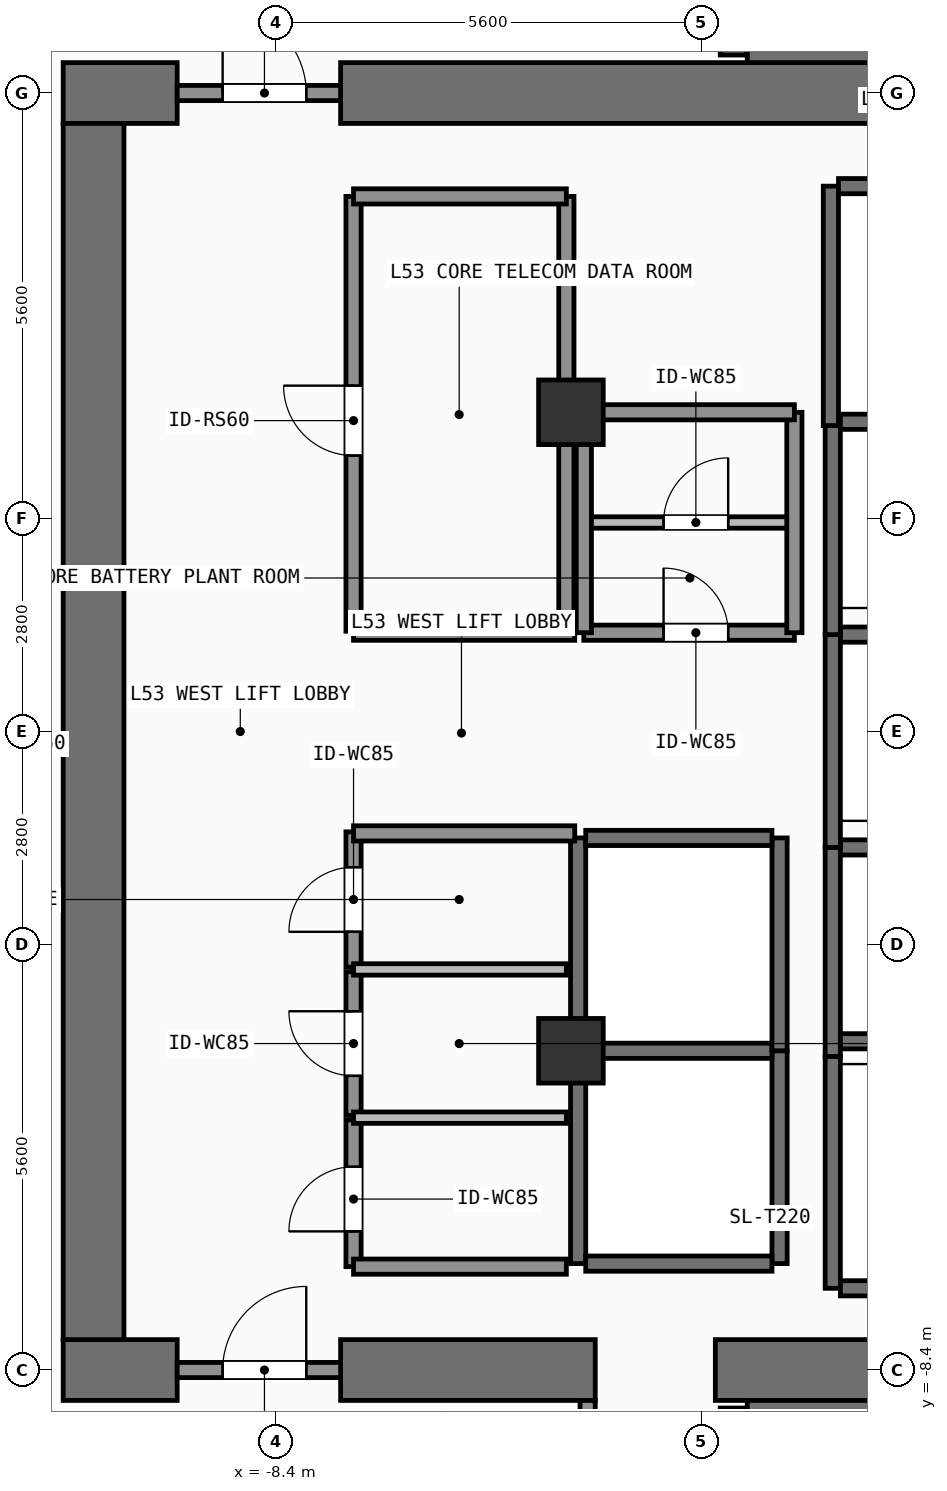
"""IFC4 building model, lengths in metres.
Left out: names, types, materials, properties, quantities, classifications, styles, units other than length and angle.
Written with IfcOpenShell. Run it as: python <this file> out.ifc"""

import sys

from ifc_helpers import new_model, si_unit, direction, frame, frame_2d, origin, origin_2d, place, context, subcontext, project, spatial, rectangle, extrude, element, fill, save


model = new_model("IFC4")
c1 = context("Model", 3, precision=1e-05, world=origin(), true_north=direction((0.0, 1.0)))
c2 = subcontext(c1, "Body", "Model", "MODEL_VIEW")
j1 = project(units=[si_unit("LENGTHUNIT", "METRE"), si_unit("PLANEANGLEUNIT", "RADIAN")], contexts=[c1])
p1 = place(None, origin())
s1 = spatial("IfcSite", under=j1, at=p1, CompositionType="ELEMENT")
p2 = place(p1, origin())
s2 = spatial("IfcBuilding", under=s1, at=p2, CompositionType="ELEMENT")
p3 = place(p2, frame((0.0, 0.0, 215.7)))
s3 = spatial("IfcBuildingStorey", under=s2, at=p3, CompositionType="ELEMENT", Elevation=215.7)
p4 = place(p3, frame((-11.2, -8.4, 0.0), z_axis=(0.0, 0.0, 1.0), x_axis=(1.0, 0.0, 0.0)))
e1 = element("IfcWall", 1, at=p4, inside=s3, PredefinedType="SHEAR", context=c2, shape_type="SweptSolid", body=[
    extrude(rectangle(XDim=1.5, YDim=0.8, at=frame_2d((0.75, 0.0))), origin(), (0.0, 0.0, 1.0), 3.9),
])
p5 = place(p3, frame((-7.55, -8.4, 0.0), z_axis=(0.0, 0.0, 1.0), x_axis=(1.0, 0.0, 0.0)))
e2 = element("IfcWall", 2, at=p5, inside=s3, PredefinedType="SHEAR", context=c2, shape_type="SweptSolid", body=[
    extrude(rectangle(XDim=3.35, YDim=0.8, at=frame_2d((1.675, 0.0))), origin(), (0.0, 0.0, 1.0), 3.9),
])
p6 = place(p3, frame((-2.62, -8.4, 0.0), z_axis=(0.0, 0.0, 1.0), x_axis=(1.0, 0.0, 0.0)))
e3 = element("IfcWall", 3, at=p6, inside=s3, PredefinedType="SHEAR", context=c2, shape_type="SweptSolid", body=[
    extrude(rectangle(XDim=7.27, YDim=0.8, at=frame_2d((3.635, 0.0))), origin(), (0.0, 0.0, 1.0), 3.9),
])
p7 = place(p3, frame((-11.2, 8.4, 0.0), z_axis=(0.0, 0.0, 1.0), x_axis=(1.0, 0.0, 0.0)))
e4 = element("IfcWall", 4, at=p7, inside=s3, PredefinedType="SHEAR", context=c2, shape_type="SweptSolid", body=[
    extrude(rectangle(XDim=1.5, YDim=0.8, at=frame_2d((0.75, 0.0))), origin(), (0.0, 0.0, 1.0), 3.9),
])
p8 = place(p3, frame((-7.55, 8.4, 0.0), z_axis=(0.0, 0.0, 1.0), x_axis=(1.0, 0.0, 0.0)))
e5 = element("IfcWall", 5, at=p8, inside=s3, PredefinedType="SHEAR", context=c2, shape_type="SweptSolid", body=[
    extrude(rectangle(XDim=16.35, YDim=0.8, at=frame_2d((8.175, 0.0))), origin(), (0.0, 0.0, 1.0), 3.9),
])
p9 = place(p3, frame((-10.8, -8.0, 0.0), z_axis=(0.0, 0.0, 1.0), x_axis=(0.0, 1.0, 0.0)))
e6 = element("IfcWall", 6, at=p9, inside=s3, PredefinedType="SHEAR", context=c2, shape_type="SweptSolid", body=[
    extrude(rectangle(XDim=16.0, YDim=0.8, at=frame_2d((8.0, 0.0))), origin(), (0.0, 0.0, 1.0), 3.9),
])
p10 = place(p3, frame((-2.2, -8.913, 0.0), z_axis=(0.0, 0.0, 1.0), x_axis=(1.0, 0.0, 0.0)))
e7 = element("IfcWall", 7, at=p10, inside=s3, PredefinedType="SHEAR", context=c2, shape_type="SweptSolid", body=[
    extrude(rectangle(XDim=6.6, YDim=0.225, at=frame_2d((3.3, 0.0))), origin(), (0.0, 0.0, 1.0), 3.9),
])
p11 = place(p3, frame((-2.38, -11.825, 0.0), z_axis=(0.0, 0.0, 1.0), x_axis=(0.0, 1.0, 0.0)))
e8 = element("IfcWall", 8, at=p11, inside=s3, PredefinedType="SHEAR", context=c2, shape_type="SweptSolid", body=[
    extrude(rectangle(XDim=2.925, YDim=0.35, at=frame_2d((1.462, 0.0))), origin(), (0.0, 0.0, 1.0), 3.9),
])
p12 = place(p3, frame((-2.2, 8.913, 0.0), z_axis=(0.0, 0.0, 1.0), x_axis=(1.0, 0.0, 0.0)))
e9 = element("IfcWall", 9, at=p12, inside=s3, PredefinedType="SHEAR", context=c2, shape_type="SweptSolid", body=[
    extrude(rectangle(XDim=6.6, YDim=0.225, at=frame_2d((3.3, 0.0))), origin(), (0.0, 0.0, 1.0), 3.9),
])
p13 = place(p3, frame((-2.38, 8.9, 0.0), z_axis=(0.0, 0.0, 1.0), x_axis=(0.0, 1.0, 0.0)))
e10 = element("IfcWall", 10, at=p13, inside=s3, PredefinedType="SHEAR", context=c2, shape_type="SweptSolid", body=[
    extrude(rectangle(XDim=2.925, YDim=0.35, at=frame_2d((1.462, 0.0))), origin(), (0.0, 0.0, 1.0), 3.9),
])
for number, where, z_axis, x_axis in (
    (11, (-4.52, -4.2, 0.0), (0.0, 0.0, 1.0), (1.0, 0.0, 0.0)),
    (12, (-4.52, 4.2, 0.0), (0.0, 0.0, 1.0), (1.0, 0.0, 0.0)),
):
    element("IfcColumn", number, at=place(p3, frame(where, z_axis=z_axis, x_axis=x_axis)), inside=s3, PredefinedType="COLUMN", context=c2, shape_type="SweptSolid", body=[
        extrude(rectangle(XDim=0.85, YDim=0.85, at=origin_2d()), origin(), (0.0, 0.0, 1.0), 3.9),
    ])
for number, where, z_axis, x_axis in (
    (13, (-4.425, -7.0, 0.0), (0.0, 0.0, 1.0), (0.0, 1.0, 0.0)),
    (14, (-1.775, -7.0, 0.0), (0.0, 0.0, 1.0), (0.0, 1.0, 0.0)),
):
    element("IfcWall", number, at=place(p3, frame(where, z_axis=z_axis, x_axis=x_axis)), inside=s3, PredefinedType="SHEAR", context=c2, shape_type="SweptSolid", body=[
        extrude(rectangle(XDim=2.8, YDim=0.2, at=frame_2d((1.4, 0.0))), origin(), (0.0, 0.0, 1.0), 3.62),
    ])
for number, where, z_axis, x_axis in (
    (15, (-4.325, -7.0, 0.0), (0.0, 0.0, 1.0), (1.0, 0.0, 0.0)),
    (16, (-4.325, -4.2, 0.0), (0.0, 0.0, 1.0), (1.0, 0.0, 0.0)),
):
    element("IfcWall", number, at=place(p3, frame(where, z_axis=z_axis, x_axis=x_axis)), inside=s3, PredefinedType="SHEAR", context=c2, shape_type="SweptSolid", body=[
        extrude(rectangle(XDim=2.45, YDim=0.2, at=frame_2d((1.225, 0.0))), origin(), (0.0, 0.0, 1.0), 3.62),
    ])
for number, where, z_axis, x_axis in (
    (17, (-4.425, -4.2, 0.0), (0.0, 0.0, 1.0), (0.0, 1.0, 0.0)),
    (18, (-1.775, -4.2, 0.0), (0.0, 0.0, 1.0), (0.0, 1.0, 0.0)),
):
    element("IfcWall", number, at=place(p3, frame(where, z_axis=z_axis, x_axis=x_axis)), inside=s3, PredefinedType="SHEAR", context=c2, shape_type="SweptSolid", body=[
        extrude(rectangle(XDim=2.8, YDim=0.2, at=frame_2d((1.4, 0.0))), origin(), (0.0, 0.0, 1.0), 3.62),
    ])
p14 = place(p3, frame((-4.325, -1.4, 0.0), z_axis=(0.0, 0.0, 1.0), x_axis=(1.0, 0.0, 0.0)))
e19 = element("IfcWall", 19, at=p14, inside=s3, PredefinedType="SHEAR", context=c2, shape_type="SweptSolid", body=[
    extrude(rectangle(XDim=2.45, YDim=0.2, at=frame_2d((1.225, 0.0))), origin(), (0.0, 0.0, 1.0), 3.62),
])
p15 = place(p3, frame((-1.075, -4.275, 0.0), z_axis=(0.0, 0.0, 1.0), x_axis=(0.0, 1.0, 0.0)))
e20 = element("IfcWall", 20, at=p15, inside=s3, PredefinedType="SHEAR", context=c2, shape_type="SweptSolid", body=[
    extrude(rectangle(XDim=2.75, YDim=0.2, at=frame_2d((1.375, 0.0))), origin(), (0.0, 0.0, 1.0), 3.62),
])
for number, where, z_axis, x_axis in (
    (21, (-0.975, -4.075, 0.0), (0.0, 0.0, 1.0), (1.0, 0.0, 0.0)),
    (22, (-0.975, -1.525, 0.0), (0.0, 0.0, 1.0), (1.0, 0.0, 0.0)),
):
    element("IfcWall", number, at=place(p3, frame(where, z_axis=z_axis, x_axis=x_axis)), inside=s3, PredefinedType="SHEAR", context=c2, shape_type="SweptSolid", body=[
        extrude(rectangle(XDim=2.35, YDim=0.2, at=frame_2d((1.175, 0.0))), origin(), (0.0, 0.0, 1.0), 3.62),
    ])
p16 = place(p3, frame((-1.075, -1.525, 0.0), z_axis=(0.0, 0.0, 1.0), x_axis=(0.0, 1.0, 0.0)))
e23 = element("IfcWall", 23, at=p16, inside=s3, PredefinedType="SHEAR", context=c2, shape_type="SweptSolid", body=[
    extrude(rectangle(XDim=2.8, YDim=0.2, at=frame_2d((1.4, 0.0))), origin(), (0.0, 0.0, 1.0), 3.62),
])
p17 = place(p3, frame((-0.975, 1.275, 0.0), z_axis=(0.0, 0.0, 1.0), x_axis=(1.0, 0.0, 0.0)))
e24 = element("IfcWall", 24, at=p17, inside=s3, PredefinedType="SHEAR", context=c2, shape_type="SweptSolid", body=[
    extrude(rectangle(XDim=2.35, YDim=0.2, at=frame_2d((1.175, 0.0))), origin(), (0.0, 0.0, 1.0), 3.62),
])
p18 = place(p3, frame((-1.075, 1.275, 0.0), z_axis=(0.0, 0.0, 1.0), x_axis=(0.0, 1.0, 0.0)))
e25 = element("IfcWall", 25, at=p18, inside=s3, PredefinedType="SHEAR", context=c2, shape_type="SweptSolid", body=[
    extrude(rectangle(XDim=2.8, YDim=0.2, at=frame_2d((1.4, 0.0))), origin(), (0.0, 0.0, 1.0), 3.62),
])
p19 = place(p3, frame((-0.975, 4.075, 0.0), z_axis=(0.0, 0.0, 1.0), x_axis=(1.0, 0.0, 0.0)))
e26 = element("IfcWall", 26, at=p19, inside=s3, PredefinedType="SHEAR", context=c2, shape_type="SweptSolid", body=[
    extrude(rectangle(XDim=2.35, YDim=0.2, at=frame_2d((1.175, 0.0))), origin(), (0.0, 0.0, 1.0), 3.62),
])
p20 = place(p3, frame((-1.1, 4.025, 0.0), z_axis=(0.0, 0.0, 1.0), x_axis=(0.0, 1.0, 0.0)))
e27 = element("IfcWall", 27, at=p20, inside=s3, PredefinedType="SHEAR", context=c2, shape_type="SweptSolid", body=[
    extrude(rectangle(XDim=3.15, YDim=0.2, at=frame_2d((1.575, 0.0))), origin(), (0.0, 0.0, 1.0), 3.62),
])
p21 = place(p3, frame((-1.0, 7.175, 0.0), z_axis=(0.0, 0.0, 1.0), x_axis=(1.0, 0.0, 0.0)))
e28 = element("IfcWall", 28, at=p21, inside=s3, PredefinedType="SHEAR", context=c2, shape_type="SweptSolid", body=[
    extrude(rectangle(XDim=2.4, YDim=0.2, at=frame_2d((1.2, 0.0))), origin(), (0.0, 0.0, 1.0), 3.62),
])
p22 = place(p3, frame((-1.075, -7.325, 0.0), z_axis=(0.0, 0.0, 1.0), x_axis=(0.0, 1.0, 0.0)))
e29 = element("IfcWall", 29, at=p22, inside=s3, PredefinedType="SHEAR", context=c2, shape_type="SweptSolid", body=[
    extrude(rectangle(XDim=3.05, YDim=0.2, at=frame_2d((1.525, 0.0))), origin(), (0.0, 0.0, 1.0), 3.62),
])
p23 = place(p3, frame((-0.975, -7.325, 0.0), z_axis=(0.0, 0.0, 1.0), x_axis=(1.0, 0.0, 0.0)))
e30 = element("IfcWall", 30, at=p23, inside=s3, PredefinedType="SHEAR", context=c2, shape_type="SweptSolid", body=[
    extrude(rectangle(XDim=2.35, YDim=0.2, at=frame_2d((1.175, 0.0))), origin(), (0.0, 0.0, 1.0), 3.62),
])
p24 = place(p3, frame((-9.7, -8.4, 0.0), z_axis=(0.0, 0.0, 1.0), x_axis=(1.0, 0.0, 0.0)))
e31 = element("IfcWall", 31, at=p24, inside=s3, PredefinedType="SOLIDWALL", context=c2, shape_type="SweptSolid", body=[
    extrude(rectangle(XDim=2.15, YDim=0.2, at=frame_2d((1.075, 0.0))), origin(), (0.0, 0.0, 1.0), 2.76),
])
p25 = place(p24, frame((0.598, 0.0, 0.0)))
e32 = element("IfcOpeningElement", 32, at=p25, cuts=e31, PredefinedType="OPENING", context=c2, shape_type="SweptSolid", body=[
    extrude(rectangle(XDim=1.1, YDim=2.15, at=frame_2d((0.55, 1.075))), frame((0.0, 0.11, 0.0), z_axis=(0.0, -1.0, 0.0), x_axis=(1.0, 0.0, 0.0)), (0.0, 0.0, 1.0), 0.22),
])
p26 = place(p3, frame((-9.7, 8.4, 0.0), z_axis=(0.0, 0.0, 1.0), x_axis=(1.0, 0.0, 0.0)))
e33 = element("IfcWall", 33, at=p26, inside=s3, PredefinedType="SOLIDWALL", context=c2, shape_type="SweptSolid", body=[
    extrude(rectangle(XDim=2.15, YDim=0.2, at=frame_2d((1.075, 0.0))), origin(), (0.0, 0.0, 1.0), 2.76),
])
p27 = place(p26, frame((0.598, 0.0, 0.0)))
e34 = element("IfcOpeningElement", 34, at=p27, cuts=e33, PredefinedType="OPENING", context=c2, shape_type="SweptSolid", body=[
    extrude(rectangle(XDim=1.1, YDim=2.15, at=frame_2d((0.55, 1.075))), frame((0.0, 0.11, 0.0), z_axis=(0.0, -1.0, 0.0), x_axis=(1.0, 0.0, 0.0)), (0.0, 0.0, 1.0), 0.22),
])
p28 = place(p3, frame((-7.38, -7.04, 0.0), z_axis=(0.0, 0.0, 1.0), x_axis=(0.0, 1.0, 0.0)))
e35 = element("IfcWall", 35, at=p28, inside=s3, PredefinedType="SOLIDWALL", context=c2, shape_type="SweptSolid", body=[
    extrude(rectangle(XDim=1.93, YDim=0.2, at=frame_2d((0.965, 0.0))), origin(), (0.0, 0.0, 1.0), 3.62),
])
p29 = place(p28, frame((0.464, 0.0, 0.0)))
e36 = element("IfcOpeningElement", 36, at=p29, cuts=e35, PredefinedType="OPENING", context=c2, shape_type="SweptSolid", body=[
    extrude(rectangle(XDim=0.85, YDim=2.1, at=frame_2d((0.425, 1.05))), frame((0.0, 0.11, 0.0), z_axis=(0.0, -1.0, 0.0), x_axis=(1.0, 0.0, 0.0)), (0.0, 0.0, 1.0), 0.22),
])
p30 = place(p3, frame((-7.38, -5.05, 0.0), z_axis=(0.0, 0.0, 1.0), x_axis=(0.0, 1.0, 0.0)))
e37 = element("IfcWall", 37, at=p30, inside=s3, PredefinedType="SOLIDWALL", context=c2, shape_type="SweptSolid", body=[
    extrude(rectangle(XDim=1.89, YDim=0.2, at=frame_2d((0.945, 0.0))), origin(), (0.0, 0.0, 1.0), 3.62),
])
p31 = place(p30, frame((0.52, 0.0, 0.0)))
e38 = element("IfcOpeningElement", 38, at=p31, cuts=e37, PredefinedType="OPENING", context=c2, shape_type="SweptSolid", body=[
    extrude(rectangle(XDim=0.85, YDim=2.1, at=frame_2d((0.425, 1.05))), frame((0.0, 0.11, 0.0), z_axis=(0.0, -1.0, 0.0), x_axis=(1.0, 0.0, 0.0)), (0.0, 0.0, 1.0), 0.22),
])
p32 = place(p3, frame((-7.38, -3.1, 0.0), z_axis=(0.0, 0.0, 1.0), x_axis=(0.0, 1.0, 0.0)))
e39 = element("IfcWall", 39, at=p32, inside=s3, PredefinedType="SOLIDWALL", context=c2, shape_type="SweptSolid", body=[
    extrude(rectangle(XDim=1.78, YDim=0.2, at=frame_2d((0.89, 0.0))), origin(), (0.0, 0.0, 1.0), 3.62),
])
p33 = place(p32, frame((0.465, 0.0, 0.0)))
e40 = element("IfcOpeningElement", 40, at=p33, cuts=e39, PredefinedType="OPENING", context=c2, shape_type="SweptSolid", body=[
    extrude(rectangle(XDim=0.85, YDim=2.1, at=frame_2d((0.425, 1.05))), frame((0.0, 0.11, 0.0), z_axis=(0.0, -1.0, 0.0), x_axis=(1.0, 0.0, 0.0)), (0.0, 0.0, 1.0), 0.22),
])
p34 = place(p3, frame((-4.35, 2.75, 0.0), z_axis=(0.0, 0.0, 1.0), x_axis=(1.0, 0.0, 0.0)))
e41 = element("IfcWall", 41, at=p34, inside=s3, PredefinedType="PARTITIONING", context=c2, shape_type="SweptSolid", body=[
    extrude(rectangle(XDim=2.77, YDim=0.15, at=frame_2d((1.385, 0.0))), origin(), (0.0, 0.0, 1.0), 3.62),
])
p35 = place(p34, frame((1.049, 0.0, 0.0)))
e42 = element("IfcOpeningElement", 42, at=p35, cuts=e41, PredefinedType="OPENING", context=c2, shape_type="SweptSolid", body=[
    extrude(rectangle(XDim=0.85, YDim=2.1, at=frame_2d((0.425, 1.05))), frame((0.0, 0.085, 0.0), z_axis=(0.0, -1.0, 0.0), x_axis=(1.0, 0.0, 0.0)), (0.0, 0.0, 1.0), 0.17),
])
p36 = place(p3, frame((-4.35, 1.3, 0.0), z_axis=(0.0, 0.0, 1.0), x_axis=(1.0, 0.0, 0.0)))
e43 = element("IfcWall", 43, at=p36, inside=s3, PredefinedType="SOLIDWALL", context=c2, shape_type="SweptSolid", body=[
    extrude(rectangle(XDim=2.77, YDim=0.2, at=frame_2d((1.385, 0.0))), origin(), (0.0, 0.0, 1.0), 3.62),
])
p37 = place(p36, frame((1.049, 0.0, 0.0)))
e44 = element("IfcOpeningElement", 44, at=p37, cuts=e43, PredefinedType="OPENING", context=c2, shape_type="SweptSolid", body=[
    extrude(rectangle(XDim=0.85, YDim=2.1, at=frame_2d((0.425, 1.05))), frame((0.0, 0.11, 0.0), z_axis=(0.0, -1.0, 0.0), x_axis=(1.0, 0.0, 0.0)), (0.0, 0.0, 1.0), 0.22),
])
p38 = place(p3, frame((-7.38, 1.32, 0.0), z_axis=(0.0, 0.0, 1.0), x_axis=(0.0, 1.0, 0.0)))
e45 = element("IfcWall", 45, at=p38, inside=s3, PredefinedType="SOLIDWALL", context=c2, shape_type="SweptSolid", body=[
    extrude(rectangle(XDim=5.72, YDim=0.2, at=frame_2d((2.86, 0.0))), origin(), (0.0, 0.0, 1.0), 3.62),
])
p39 = place(p38, frame((2.31, 0.0, 0.0)))
e46 = element("IfcOpeningElement", 46, at=p39, cuts=e45, PredefinedType="OPENING", context=c2, shape_type="SweptSolid", body=[
    extrude(rectangle(XDim=0.92, YDim=2.1, at=frame_2d((0.46, 1.05))), frame((0.0, 0.11, 0.0), z_axis=(0.0, -1.0, 0.0), x_axis=(1.0, 0.0, 0.0)), (0.0, 0.0, 1.0), 0.22),
])
p40 = place(p3, frame((-4.3, -12.06, 0.0), z_axis=(0.0, 0.0, 1.0), x_axis=(0.0, 1.0, 0.0)))
e47 = element("IfcWall", 47, at=p40, inside=s3, PredefinedType="SOLIDWALL", context=c2, shape_type="SweptSolid", body=[
    extrude(rectangle(XDim=3.26, YDim=0.2, at=frame_2d((1.63, 0.0))), origin(), (0.0, 0.0, 1.0), 3.62),
])
for number, where, z_axis, x_axis in (
    (48, (-7.38, -1.34, 0.0), (0.0, 0.0, 1.0), (1.0, 0.0, 0.0)),
    (49, (-7.38, 1.3, 0.0), (0.0, 0.0, 1.0), (1.0, 0.0, 0.0)),
):
    element("IfcWall", number, at=place(p3, frame(where, z_axis=z_axis, x_axis=x_axis)), inside=s3, PredefinedType="SOLIDWALL", context=c2, shape_type="SweptSolid", body=[
        extrude(rectangle(XDim=2.91, YDim=0.2, at=frame_2d((1.455, 0.0))), origin(), (0.0, 0.0, 1.0), 3.62),
    ])
p41 = place(p3, frame((-7.38, -7.04, 0.0), z_axis=(0.0, 0.0, 1.0), x_axis=(1.0, 0.0, 0.0)))
e50 = element("IfcWall", 50, at=p41, inside=s3, PredefinedType="SOLIDWALL", context=c2, shape_type="SweptSolid", body=[
    extrude(rectangle(XDim=2.8, YDim=0.2, at=frame_2d((1.4, 0.0))), origin(), (0.0, 0.0, 1.0), 3.62),
])
for number, where, z_axis, x_axis in (
    (51, (-7.38, -5.08, 0.0), (0.0, 0.0, 1.0), (1.0, 0.0, 0.0)),
    (52, (-7.38, -3.13, 0.0), (0.0, 0.0, 1.0), (1.0, 0.0, 0.0)),
):
    element("IfcWall", number, at=place(p3, frame(where, z_axis=z_axis, x_axis=x_axis)), inside=s3, PredefinedType="PARTITIONING", context=c2, shape_type="SweptSolid", body=[
        extrude(rectangle(XDim=2.8, YDim=0.15, at=frame_2d((1.4, 0.0))), origin(), (0.0, 0.0, 1.0), 3.62),
    ])
for number, where, z_axis, x_axis in (
    (53, (-4.35, 1.3, 0.0), (0.0, 0.0, 1.0), (0.0, 1.0, 0.0)),
    (54, (-1.58, 1.3, 0.0), (0.0, 0.0, 1.0), (0.0, 1.0, 0.0)),
):
    element("IfcWall", number, at=place(p3, frame(where, z_axis=z_axis, x_axis=x_axis)), inside=s3, PredefinedType="SOLIDWALL", context=c2, shape_type="SweptSolid", body=[
        extrude(rectangle(XDim=2.9, YDim=0.2, at=frame_2d((1.45, 0.0))), origin(), (0.0, 0.0, 1.0), 3.62),
    ])
p42 = place(p3, frame((-4.35, 4.2, 0.0), z_axis=(0.0, 0.0, 1.0), x_axis=(1.0, 0.0, 0.0)))
e55 = element("IfcWall", 55, at=p42, inside=s3, PredefinedType="SOLIDWALL", context=c2, shape_type="SweptSolid", body=[
    extrude(rectangle(XDim=2.77, YDim=0.2, at=frame_2d((1.385, 0.0))), origin(), (0.0, 0.0, 1.0), 3.62),
])
p43 = place(p3, frame((-4.58, 1.32, 0.0), z_axis=(0.0, 0.0, 1.0), x_axis=(0.0, 1.0, 0.0)))
e56 = element("IfcWall", 56, at=p43, inside=s3, PredefinedType="SOLIDWALL", context=c2, shape_type="SweptSolid", body=[
    extrude(rectangle(XDim=5.72, YDim=0.2, at=frame_2d((2.86, 0.0))), origin(), (0.0, 0.0, 1.0), 3.62),
])
p44 = place(p3, frame((-7.38, 7.04, 0.0), z_axis=(0.0, 0.0, 1.0), x_axis=(1.0, 0.0, 0.0)))
e57 = element("IfcWall", 57, at=p44, inside=s3, PredefinedType="SOLIDWALL", context=c2, shape_type="SweptSolid", body=[
    extrude(rectangle(XDim=2.8, YDim=0.2, at=frame_2d((1.4, 0.0))), origin(), (0.0, 0.0, 1.0), 3.62),
])
p45 = place(p25, origin())
e58 = element("IfcDoor", 58, at=p45, inside=s3, OperationType="SINGLE_SWING_RIGHT", PredefinedType="DOOR", context=c2, shape_type="SweptSolid", body=[
    extrude(rectangle(XDim=1.1, YDim=2.15, at=frame_2d((0.55, 1.075))), frame((0.0, 0.025, 0.0), z_axis=(0.0, -1.0, 0.0), x_axis=(1.0, 0.0, 0.0)), (0.0, 0.0, 1.0), 0.05),
])
fill(e32, e58)
p46 = place(p27, origin())
e59 = element("IfcDoor", 59, at=p46, inside=s3, OperationType="SINGLE_SWING_LEFT", PredefinedType="DOOR", context=c2, shape_type="SweptSolid", body=[
    extrude(rectangle(XDim=1.1, YDim=2.15, at=frame_2d((0.55, 1.075))), frame((0.0, 0.025, 0.0), z_axis=(0.0, -1.0, 0.0), x_axis=(1.0, 0.0, 0.0)), (0.0, 0.0, 1.0), 0.05),
])
fill(e34, e59)
p47 = place(p29, origin())
e60 = element("IfcDoor", 60, at=p47, inside=s3, OperationType="SINGLE_SWING_LEFT", PredefinedType="DOOR", context=c2, shape_type="SweptSolid", body=[
    extrude(rectangle(XDim=0.85, YDim=2.1, at=frame_2d((0.425, 1.05))), frame((0.0, 0.025, 0.0), z_axis=(0.0, -1.0, 0.0), x_axis=(1.0, 0.0, 0.0)), (0.0, 0.0, 1.0), 0.05),
])
fill(e36, e60)
p48 = place(p31, origin())
e61 = element("IfcDoor", 61, at=p48, inside=s3, OperationType="SINGLE_SWING_RIGHT", PredefinedType="DOOR", context=c2, shape_type="SweptSolid", body=[
    extrude(rectangle(XDim=0.85, YDim=2.1, at=frame_2d((0.425, 1.05))), frame((0.0, 0.025, 0.0), z_axis=(0.0, -1.0, 0.0), x_axis=(1.0, 0.0, 0.0)), (0.0, 0.0, 1.0), 0.05),
])
fill(e38, e61)
p49 = place(p33, origin())
e62 = element("IfcDoor", 62, at=p49, inside=s3, OperationType="SINGLE_SWING_LEFT", PredefinedType="DOOR", context=c2, shape_type="SweptSolid", body=[
    extrude(rectangle(XDim=0.85, YDim=2.1, at=frame_2d((0.425, 1.05))), frame((0.0, 0.025, 0.0), z_axis=(0.0, -1.0, 0.0), x_axis=(1.0, 0.0, 0.0)), (0.0, 0.0, 1.0), 0.05),
])
fill(e40, e62)
p50 = place(p35, origin())
e63 = element("IfcDoor", 63, at=p50, inside=s3, OperationType="SINGLE_SWING_RIGHT", PredefinedType="DOOR", context=c2, shape_type="SweptSolid", body=[
    extrude(rectangle(XDim=0.85, YDim=2.1, at=frame_2d((0.425, 1.05))), frame((0.0, 0.025, 0.0), z_axis=(0.0, -1.0, 0.0), x_axis=(1.0, 0.0, 0.0)), (0.0, 0.0, 1.0), 0.05),
])
fill(e42, e63)
p51 = place(p37, origin())
e64 = element("IfcDoor", 64, at=p51, inside=s3, OperationType="SINGLE_SWING_LEFT", PredefinedType="DOOR", context=c2, shape_type="SweptSolid", body=[
    extrude(rectangle(XDim=0.85, YDim=2.1, at=frame_2d((0.425, 1.05))), frame((0.0, 0.025, 0.0), z_axis=(0.0, -1.0, 0.0), x_axis=(1.0, 0.0, 0.0)), (0.0, 0.0, 1.0), 0.05),
])
fill(e44, e64)
p52 = place(p39, origin())
e65 = element("IfcDoor", 65, at=p52, inside=s3, OperationType="SINGLE_SWING_RIGHT", PredefinedType="DOOR", context=c2, shape_type="SweptSolid", body=[
    extrude(rectangle(XDim=0.92, YDim=2.1, at=frame_2d((0.46, 1.05))), frame((0.0, 0.025, 0.0), z_axis=(0.0, -1.0, 0.0), x_axis=(1.0, 0.0, 0.0)), (0.0, 0.0, 1.0), 0.05),
])
fill(e46, e65)
save(model, sys.argv[1])
